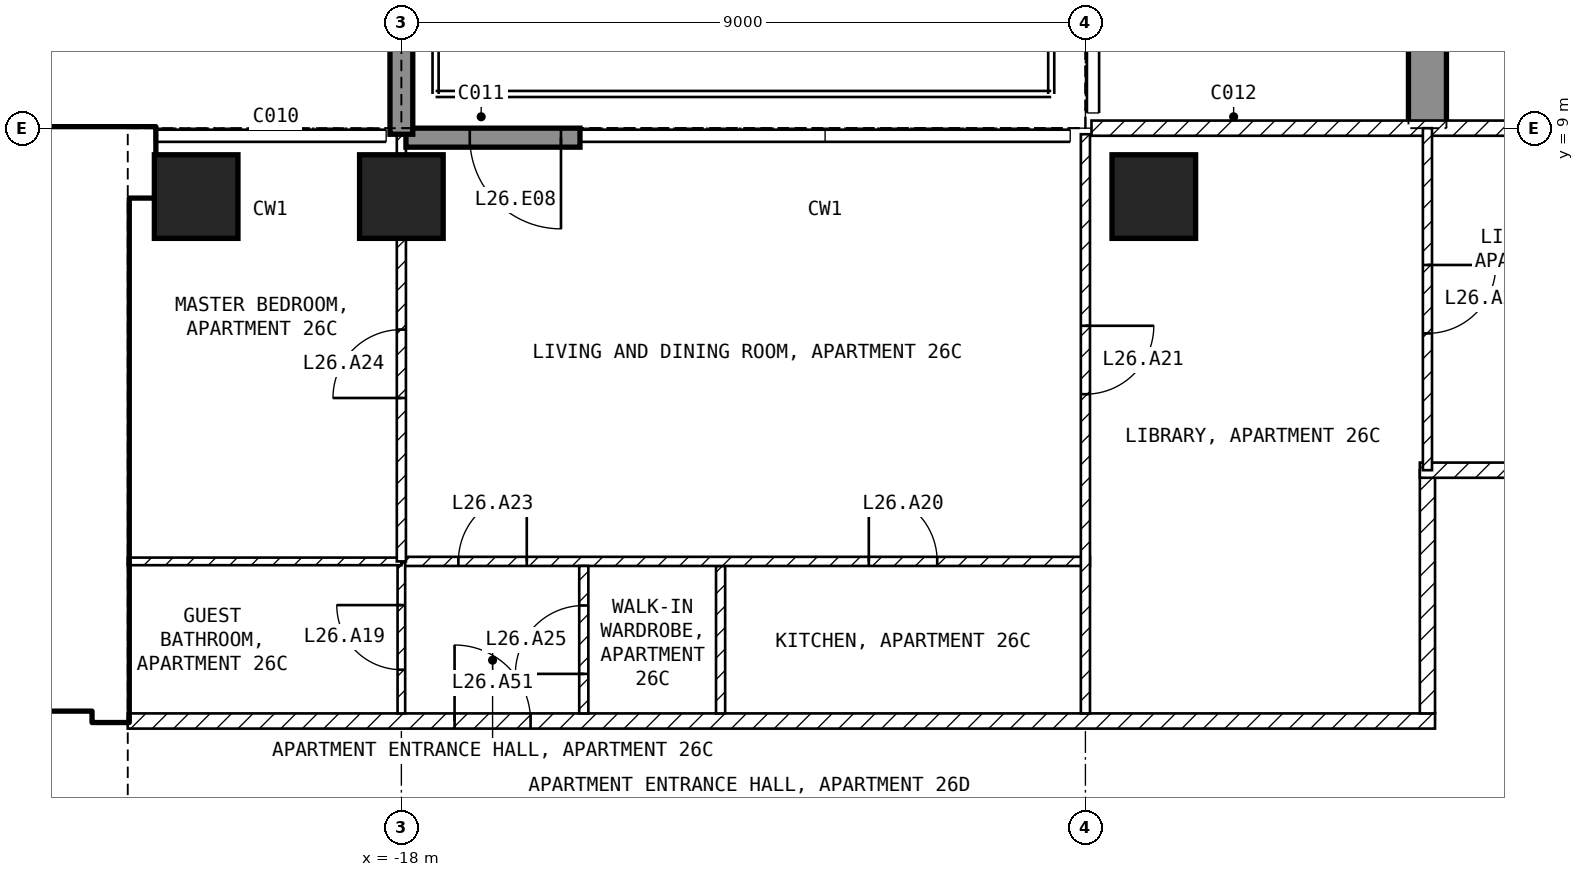
"""IFC4 building model, lengths in metres.
Left out: names, types, materials, properties, quantities, classifications, styles, units other than length and angle.
Written with IfcOpenShell. Run it as: python <this file> out.ifc"""

import sys

from ifc_helpers import new_model, si_unit, direction, frame, frame_2d, origin, origin_2d, place, context, subcontext, project, spatial, polyline, rectangle, outline, extrude, element, fill, save


model = new_model("IFC4")
c1 = context("Model", 3, precision=1e-05, world=origin(), true_north=direction((0.0, 1.0)))
c2 = subcontext(c1, "Body", "Model", "MODEL_VIEW")
j1 = project(units=[si_unit("LENGTHUNIT", "METRE"), si_unit("PLANEANGLEUNIT", "RADIAN")], contexts=[c1])
p1 = place(None, origin())
s1 = spatial("IfcSite", under=j1, at=p1, CompositionType="ELEMENT")
p2 = place(p1, origin())
s2 = spatial("IfcBuilding", under=s1, at=p2, CompositionType="ELEMENT")
p3 = place(p2, frame((0.0, 0.0, 112.9)))
s3 = spatial("IfcBuildingStorey", under=s2, at=p3, CompositionType="ELEMENT", Elevation=112.9)
for number, where, z_axis, x_axis in (
    (1, (-20.7, 8.1, -0.25), (0.0, 0.0, 1.0), (1.0, 0.0, 0.0)),
    (2, (-18.0, 8.1, -0.25), (0.0, 0.0, 1.0), (1.0, 0.0, 0.0)),
    (3, (-8.1, 8.1, -0.25), (0.0, 0.0, 1.0), (1.0, 0.0, 0.0)),
):
    element("IfcColumn", number, at=place(p3, frame(where, z_axis=z_axis, x_axis=x_axis)), inside=s3, PredefinedType="COLUMN", context=c2, shape_type="SweptSolid", body=[
        extrude(rectangle(XDim=1.1, YDim=1.1, at=origin_2d()), origin(), (0.0, 0.0, 1.0), 3.5),
    ])
p4 = place(p3, frame((-4.75, 9.0, -0.25), z_axis=(1.0, 0.0, 0.0), x_axis=(0.0, 1.0, 0.0)))
e4 = element("IfcWall", 4, at=p4, inside=s3, PredefinedType="SHEAR", context=c2, shape_type="SweptSolid", body=[
    extrude(outline(polyline([(0.0, 0.0), (2.1, 0.0), (2.1, 2.65), (4.5, 2.65), (4.5, 0.0), (9.9, 0.0), (9.9, 2.65), (12.3, 2.65), (12.3, 0.0), (16.55, 0.0), (16.55, 3.5), (0.0, 3.5), (0.0, 0.0)])), origin(), (0.0, 0.0, 1.0), 0.5),
])
p5 = place(p3, frame((-15.65, 8.875, 0.0), z_axis=(0.0, 0.0, 1.0), x_axis=(-1.0, 0.0, 0.0)))
e5 = element("IfcWall", 5, at=p5, inside=s3, PredefinedType="SOLIDWALL", context=c2, shape_type="SweptSolid", body=[
    extrude(rectangle(XDim=2.29, YDim=0.25, at=frame_2d((1.145, 0.0))), origin(), (0.0, 0.0, 1.0), 3.25),
])
p6 = place(p5, frame((0.25, 0.0, 0.0)))
e6 = element("IfcOpeningElement", 6, at=p6, cuts=e5, PredefinedType="OPENING", context=c2, shape_type="SweptSolid", body=[
    extrude(rectangle(XDim=1.2, YDim=2.4, at=frame_2d((0.6, 1.2))), frame((0.0, 0.135, 0.0), z_axis=(0.0, -1.0, 0.0), x_axis=(1.0, 0.0, 0.0)), (0.0, 0.0, 1.0), 0.27),
])
p7 = place(p3, frame((-18.0, 8.92, 0.0), z_axis=(0.0, 0.0, 1.0), x_axis=(0.0, 1.0, 0.0)))
e7 = element("IfcWall", 7, at=p7, inside=s3, PredefinedType="SOLIDWALL", context=c2, shape_type="SweptSolid", body=[
    extrude(rectangle(XDim=2.82, YDim=0.3, at=frame_2d((1.41, 0.0))), origin(), (0.0, 0.0, 1.0), 3.25),
])
p8 = place(p3, frame((-29.45, 8.55, 0.0), z_axis=(0.0, 0.0, 1.0), x_axis=(1.0, 0.0, 0.0)))
e8 = element("IfcWall", 8, at=p8, inside=s3, PredefinedType="SHEAR", context=c2, shape_type="SweptSolid", body=[
    extrude(rectangle(XDim=8.2, YDim=0.9, at=frame_2d((4.1, 0.0))), origin(), (0.0, 0.0, 1.0), 3.25),
])
p9 = place(p3, frame((-21.825, 1.2, 0.0), z_axis=(0.0, 0.0, 1.0), x_axis=(0.0, 1.0, 0.0)))
e9 = element("IfcWall", 9, at=p9, inside=s3, PredefinedType="SHEAR", context=c2, shape_type="SweptSolid", body=[
    extrude(rectangle(XDim=6.9, YDim=0.45, at=frame_2d((3.45, 0.0))), origin(), (0.0, 0.0, 1.0), 3.25),
])
p10 = place(p3, frame((-33.05, 1.45, 0.0), z_axis=(0.0, 0.0, 1.0), x_axis=(1.0, 0.0, 0.0)))
e10 = element("IfcWall", 10, at=p10, inside=s3, PredefinedType="SOLIDWALL", context=c2, shape_type="SweptSolid", body=[
    extrude(rectangle(XDim=11.0, YDim=0.2, at=frame_2d((5.5, 0.0))), origin(), (0.0, 0.0, 1.0), 3.25),
])
p11 = place(p10, frame((9.25, 0.0, 0.0)))
e11 = element("IfcOpeningElement", 11, at=p11, cuts=e10, PredefinedType="OPENING", context=c2, shape_type="SweptSolid", body=[
    extrude(rectangle(XDim=1.0, YDim=2.1, at=frame_2d((0.5, 1.05))), frame((0.0, 0.11, 0.0), z_axis=(0.0, -1.0, 0.0), x_axis=(1.0, 0.0, 0.0)), (0.0, 0.0, 1.0), 0.22),
])
p12 = place(p10, frame((6.75, 0.0, 0.0)))
e12 = element("IfcOpeningElement", 12, at=p12, cuts=e10, PredefinedType="OPENING", context=c2, shape_type="SweptSolid", body=[
    extrude(rectangle(XDim=1.0, YDim=2.1, at=frame_2d((0.5, 1.05))), frame((0.0, 0.11, 0.0), z_axis=(0.0, -1.0, 0.0), x_axis=(1.0, 0.0, 0.0)), (0.0, 0.0, 1.0), 0.22),
])
p13 = place(p10, frame((1.025, 0.0, 0.0)))
e13 = element("IfcOpeningElement", 13, at=p13, cuts=e10, PredefinedType="OPENING", context=c2, shape_type="SweptSolid", body=[
    extrude(rectangle(XDim=0.9, YDim=2.1, at=frame_2d((0.45, 1.05))), frame((0.0, 0.11, 0.0), z_axis=(0.0, -1.0, 0.0), x_axis=(1.0, 0.0, 0.0)), (0.0, 0.0, 1.0), 0.22),
])
p14 = place(p3, frame((-28.35, 5.15, 0.0), z_axis=(0.0, 0.0, 1.0), x_axis=(1.0, 0.0, 0.0)))
e14 = element("IfcWall", 14, at=p14, inside=s3, PredefinedType="SOLIDWALL", context=c2, shape_type="SweptSolid", body=[
    extrude(rectangle(XDim=6.3, YDim=0.2, at=frame_2d((3.15, 0.0))), origin(), (0.0, 0.0, 1.0), 3.25),
])
p15 = place(p14, frame((5.1, 0.0, 0.0)))
e15 = element("IfcOpeningElement", 15, at=p15, cuts=e14, PredefinedType="OPENING", context=c2, shape_type="SweptSolid", body=[
    extrude(rectangle(XDim=1.0, YDim=2.1, at=frame_2d((0.5, 1.05))), frame((0.0, 0.11, 0.0), z_axis=(0.0, -1.0, 0.0), x_axis=(1.0, 0.0, 0.0)), (0.0, 0.0, 1.0), 0.22),
])
p16 = place(p3, frame((-21.6, 1.2, 0.0), z_axis=(0.0, 0.0, 1.0), x_axis=(1.0, 0.0, 0.0)))
e16 = element("IfcWall", 16, at=p16, inside=s3, PredefinedType="PARTITIONING", context=c2, shape_type="SweptSolid", body=[
    extrude(rectangle(XDim=17.2, YDim=0.2, at=frame_2d((8.6, 0.0))), origin(), (0.0, 0.0, 1.0), 3.25),
])
p17 = place(p16, frame((4.3, 0.0, 0.0)))
e17 = element("IfcOpeningElement", 17, at=p17, cuts=e16, PredefinedType="OPENING", context=c2, shape_type="SweptSolid", body=[
    extrude(rectangle(XDim=1.0, YDim=2.1, at=frame_2d((0.5, 1.05))), frame((0.0, 0.11, 0.0), z_axis=(0.0, -1.0, 0.0), x_axis=(1.0, 0.0, 0.0)), (0.0, 0.0, 1.0), 0.22),
])
p18 = place(p3, frame((-4.5, 1.3, 0.0), z_axis=(0.0, 0.0, 1.0), x_axis=(0.0, 1.0, 0.0)))
e18 = element("IfcWall", 18, at=p18, inside=s3, PredefinedType="PARTITIONING", context=c2, shape_type="SweptSolid", body=[
    extrude(rectangle(XDim=3.2, YDim=0.2, at=frame_2d((1.6, 0.0))), origin(), (0.0, 0.0, 1.0), 3.25),
])
p19 = place(p3, frame((-4.6, 4.5, 0.0), z_axis=(0.0, 0.0, 1.0), x_axis=(1.0, 0.0, 0.0)))
e19 = element("IfcWall", 19, at=p19, inside=s3, PredefinedType="PARTITIONING", context=c2, shape_type="SweptSolid", body=[
    extrude(rectangle(XDim=3.5, YDim=0.2, at=frame_2d((1.75, 0.0))), origin(), (0.0, 0.0, 1.0), 3.25),
])
p20 = place(p3, frame((-8.92, 9.0, 0.0), z_axis=(0.0, 0.0, 1.0), x_axis=(1.0, 0.0, 0.0)))
e20 = element("IfcWall", 20, at=p20, inside=s3, PredefinedType="PARTITIONING", context=c2, shape_type="SweptSolid", body=[
    extrude(rectangle(XDim=17.84, YDim=0.2, at=frame_2d((8.92, 0.0))), origin(), (0.0, 0.0, 1.0), 3.25),
])
p21 = place(p20, frame((8.42, 0.0, 0.0)))
e21 = element("IfcOpeningElement", 21, at=p21, cuts=e20, PredefinedType="OPENING", context=c2, shape_type="SweptSolid", body=[
    extrude(rectangle(XDim=1.0, YDim=2.1, at=frame_2d((0.5, 1.05))), frame((0.0, 0.11, 0.0), z_axis=(0.0, -1.0, 0.0), x_axis=(1.0, 0.0, 0.0)), (0.0, 0.0, 1.0), 0.22),
])
p22 = place(p3, frame((-13.8, 1.3, 0.0), z_axis=(0.0, 0.0, 1.0), x_axis=(0.0, 1.0, 0.0)))
e22 = element("IfcWall", 22, at=p22, inside=s3, PredefinedType="PARTITIONING", context=c2, shape_type="SweptSolid", body=[
    extrude(rectangle(XDim=1.94, YDim=0.12, at=frame_2d((0.97, 0.0))), origin(), (0.0, 0.0, 1.0), 3.25),
])
p23 = place(p3, frame((-18.0, 3.3, 0.0), z_axis=(0.0, 0.0, 1.0), x_axis=(1.0, 0.0, 0.0)))
e23 = element("IfcWall", 23, at=p23, inside=s3, PredefinedType="PARTITIONING", context=c2, shape_type="SweptSolid", body=[
    extrude(rectangle(XDim=9.06, YDim=0.12, at=frame_2d((4.53, 0.0))), origin(), (0.0, 0.0, 1.0), 3.25),
])
p24 = place(p23, frame((6.15, 0.0, 0.0)))
e24 = element("IfcOpeningElement", 24, at=p24, cuts=e23, PredefinedType="OPENING", context=c2, shape_type="SweptSolid", body=[
    extrude(rectangle(XDim=0.9, YDim=2.1, at=frame_2d((0.45, 1.05))), frame((0.0, 0.07, 0.0), z_axis=(0.0, -1.0, 0.0), x_axis=(1.0, 0.0, 0.0)), (0.0, 0.0, 1.0), 0.14),
])
p25 = place(p23, frame((0.75, 0.0, 0.0)))
e25 = element("IfcOpeningElement", 25, at=p25, cuts=e23, PredefinedType="OPENING", context=c2, shape_type="SweptSolid", body=[
    extrude(rectangle(XDim=0.9, YDim=2.1, at=frame_2d((0.45, 1.05))), frame((0.0, 0.07, 0.0), z_axis=(0.0, -1.0, 0.0), x_axis=(1.0, 0.0, 0.0)), (0.0, 0.0, 1.0), 0.14),
])
p26 = place(p3, frame((-9.0, 8.92, 0.0), z_axis=(0.0, 0.0, 1.0), x_axis=(0.0, -1.0, 0.0)))
e26 = element("IfcWall", 26, at=p26, inside=s3, PredefinedType="PARTITIONING", context=c2, shape_type="SweptSolid", body=[
    extrude(rectangle(XDim=7.62, YDim=0.12, at=frame_2d((3.81, 0.0))), origin(), (0.0, 0.0, 1.0), 3.25),
])
p27 = place(p26, frame((2.52, 0.0, 0.0)))
e27 = element("IfcOpeningElement", 27, at=p27, cuts=e26, PredefinedType="OPENING", context=c2, shape_type="SweptSolid", body=[
    extrude(rectangle(XDim=0.9, YDim=2.1, at=frame_2d((0.45, 1.05))), frame((0.0, 0.07, 0.0), z_axis=(0.0, -1.0, 0.0), x_axis=(1.0, 0.0, 0.0)), (0.0, 0.0, 1.0), 0.14),
])
p28 = place(p3, frame((-15.6, 1.3, 0.0), z_axis=(0.0, 0.0, 1.0), x_axis=(0.0, 1.0, 0.0)))
e28 = element("IfcWall", 28, at=p28, inside=s3, PredefinedType="PARTITIONING", context=c2, shape_type="SweptSolid", body=[
    extrude(rectangle(XDim=1.94, YDim=0.12, at=frame_2d((0.97, 0.0))), origin(), (0.0, 0.0, 1.0), 3.25),
])
p29 = place(p28, frame((0.52, 0.0, 0.0)))
e29 = element("IfcOpeningElement", 29, at=p29, cuts=e28, PredefinedType="OPENING", context=c2, shape_type="SweptSolid", body=[
    extrude(rectangle(XDim=0.9, YDim=2.1, at=frame_2d((0.45, 1.05))), frame((0.0, 0.07, 0.0), z_axis=(0.0, -1.0, 0.0), x_axis=(1.0, 0.0, 0.0)), (0.0, 0.0, 1.0), 0.14),
])
p30 = place(p3, frame((-18.0, 1.3, 0.0), z_axis=(0.0, 0.0, 1.0), x_axis=(0.0, 1.0, 0.0)))
e30 = element("IfcWall", 30, at=p30, inside=s3, PredefinedType="PARTITIONING", context=c2, shape_type="SweptSolid", body=[
    extrude(rectangle(XDim=2.0, YDim=0.1, at=frame_2d((1.0, 0.0))), origin(), (0.0, 0.0, 1.0), 2.414),
])
p31 = place(p30, frame((0.575, 0.0, 0.0)))
e31 = element("IfcOpeningElement", 31, at=p31, cuts=e30, PredefinedType="OPENING", context=c2, shape_type="SweptSolid", body=[
    extrude(rectangle(XDim=0.85, YDim=2.1, at=frame_2d((0.425, 1.05))), frame((0.0, 0.06, 0.0), z_axis=(0.0, -1.0, 0.0), x_axis=(1.0, 0.0, 0.0)), (0.0, 0.0, 1.0), 0.12),
])
p32 = place(p3, frame((-21.6, 3.3, 0.0), z_axis=(0.0, 0.0, 1.0), x_axis=(1.0, 0.0, 0.0)))
e32 = element("IfcWall", 32, at=p32, inside=s3, PredefinedType="PARTITIONING", context=c2, shape_type="SweptSolid", body=[
    extrude(rectangle(XDim=3.6, YDim=0.1, at=frame_2d((1.8, 0.0))), origin(), (0.0, 0.0, 1.0), 3.25),
])
p33 = place(p3, frame((-18.0, 3.3, 0.0), z_axis=(0.0, 0.0, 1.0), x_axis=(0.0, 1.0, 0.0)))
e33 = element("IfcWall", 33, at=p33, inside=s3, PredefinedType="PARTITIONING", context=c2, shape_type="SweptSolid", body=[
    extrude(rectangle(XDim=5.62, YDim=0.12, at=frame_2d((2.81, 0.0))), origin(), (0.0, 0.0, 1.0), 2.414),
])
p34 = place(p33, frame((2.15, 0.0, 0.0)))
e34 = element("IfcOpeningElement", 34, at=p34, cuts=e33, PredefinedType="OPENING", context=c2, shape_type="SweptSolid", body=[
    extrude(rectangle(XDim=0.9, YDim=2.1, at=frame_2d((0.45, 1.05))), frame((0.0, 0.07, 0.0), z_axis=(0.0, -1.0, 0.0), x_axis=(1.0, 0.0, 0.0)), (0.0, 0.0, 1.0), 0.14),
])
p35 = place(p3, frame((-4.5, 9.0, 0.0), z_axis=(0.0, 0.0, 1.0), x_axis=(0.0, -1.0, 0.0)))
e35 = element("IfcWall", 35, at=p35, inside=s3, PredefinedType="PARTITIONING", context=c2, shape_type="SweptSolid", body=[
    extrude(rectangle(XDim=4.5, YDim=0.12, at=frame_2d((2.25, 0.0))), origin(), (0.0, 0.0, 1.0), 3.25),
])
p36 = place(p35, frame((1.8, 0.0, 0.0)))
e36 = element("IfcOpeningElement", 36, at=p36, cuts=e35, PredefinedType="OPENING", context=c2, shape_type="SweptSolid", body=[
    extrude(rectangle(XDim=0.9, YDim=2.1, at=frame_2d((0.45, 1.05))), frame((0.0, 0.07, 0.0), z_axis=(0.0, -1.0, 0.0), x_axis=(1.0, 0.0, 0.0)), (0.0, 0.0, 1.0), 0.14),
])
p37 = place(p6, origin())
e37 = element("IfcDoor", 37, at=p37, inside=s3, OperationType="SINGLE_SWING_LEFT", PredefinedType="DOOR", context=c2, shape_type="SweptSolid", body=[
    extrude(rectangle(XDim=1.2, YDim=2.4, at=frame_2d((0.6, 1.2))), frame((0.0, 0.025, 0.0), z_axis=(0.0, -1.0, 0.0), x_axis=(1.0, 0.0, 0.0)), (0.0, 0.0, 1.0), 0.05),
])
fill(e6, e37)
p38 = place(p15, origin())
e38 = element("IfcDoor", 38, at=p38, inside=s3, OperationType="SINGLE_SWING_LEFT", PredefinedType="DOOR", context=c2, shape_type="SweptSolid", body=[
    extrude(rectangle(XDim=1.0, YDim=2.1, at=frame_2d((0.5, 1.05))), frame((0.0, 0.025, 0.0), z_axis=(0.0, -1.0, 0.0), x_axis=(1.0, 0.0, 0.0)), (0.0, 0.0, 1.0), 0.05),
])
fill(e15, e38)
p39 = place(p31, origin())
e39 = element("IfcDoor", 39, at=p39, inside=s3, OperationType="SINGLE_SWING_RIGHT", PredefinedType="DOOR", context=c2, shape_type="SweptSolid", body=[
    extrude(rectangle(XDim=0.85, YDim=2.1, at=frame_2d((0.425, 1.05))), frame((0.0, 0.025, 0.0), z_axis=(0.0, -1.0, 0.0), x_axis=(1.0, 0.0, 0.0)), (0.0, 0.0, 1.0), 0.05),
])
fill(e31, e39)
p40 = place(p24, origin())
e40 = element("IfcDoor", 40, at=p40, inside=s3, OperationType="SINGLE_SWING_LEFT", PredefinedType="DOOR", context=c2, shape_type="SweptSolid", body=[
    extrude(rectangle(XDim=0.9, YDim=2.1, at=frame_2d((0.45, 1.05))), frame((0.0, 0.025, 0.0), z_axis=(0.0, -1.0, 0.0), x_axis=(1.0, 0.0, 0.0)), (0.0, 0.0, 1.0), 0.05),
])
fill(e24, e40)
p41 = place(p27, origin())
e41 = element("IfcDoor", 41, at=p41, inside=s3, OperationType="SINGLE_SWING_LEFT", PredefinedType="DOOR", context=c2, shape_type="SweptSolid", body=[
    extrude(rectangle(XDim=0.9, YDim=2.1, at=frame_2d((0.45, 1.05))), frame((0.0, 0.025, 0.0), z_axis=(0.0, -1.0, 0.0), x_axis=(1.0, 0.0, 0.0)), (0.0, 0.0, 1.0), 0.05),
])
fill(e27, e41)
p42 = place(p36, origin())
e42 = element("IfcDoor", 42, at=p42, inside=s3, OperationType="SINGLE_SWING_LEFT", PredefinedType="DOOR", context=c2, shape_type="SweptSolid", body=[
    extrude(rectangle(XDim=0.9, YDim=2.1, at=frame_2d((0.45, 1.05))), frame((0.0, 0.025, 0.0), z_axis=(0.0, -1.0, 0.0), x_axis=(1.0, 0.0, 0.0)), (0.0, 0.0, 1.0), 0.05),
])
fill(e36, e42)
p43 = place(p25, origin())
e43 = element("IfcDoor", 43, at=p43, inside=s3, OperationType="SINGLE_SWING_RIGHT", PredefinedType="DOOR", context=c2, shape_type="SweptSolid", body=[
    extrude(rectangle(XDim=0.9, YDim=2.1, at=frame_2d((0.45, 1.05))), frame((0.0, 0.025, 0.0), z_axis=(0.0, -1.0, 0.0), x_axis=(1.0, 0.0, 0.0)), (0.0, 0.0, 1.0), 0.05),
])
fill(e25, e43)
p44 = place(p34, origin())
e44 = element("IfcDoor", 44, at=p44, inside=s3, OperationType="SINGLE_SWING_LEFT", PredefinedType="DOOR", context=c2, shape_type="SweptSolid", body=[
    extrude(rectangle(XDim=0.9, YDim=2.1, at=frame_2d((0.45, 1.05))), frame((0.0, 0.025, 0.0), z_axis=(0.0, -1.0, 0.0), x_axis=(1.0, 0.0, 0.0)), (0.0, 0.0, 1.0), 0.05),
])
fill(e34, e44)
p45 = place(p29, origin())
e45 = element("IfcDoor", 45, at=p45, inside=s3, OperationType="SINGLE_SWING_LEFT", PredefinedType="DOOR", context=c2, shape_type="SweptSolid", body=[
    extrude(rectangle(XDim=0.9, YDim=2.1, at=frame_2d((0.45, 1.05))), frame((0.0, 0.025, 0.0), z_axis=(0.0, -1.0, 0.0), x_axis=(1.0, 0.0, 0.0)), (0.0, 0.0, 1.0), 0.05),
])
fill(e29, e45)
p46 = place(p17, origin())
e46 = element("IfcDoor", 46, at=p46, inside=s3, OperationType="SINGLE_SWING_LEFT", PredefinedType="DOOR", context=c2, shape_type="SweptSolid", body=[
    extrude(rectangle(XDim=1.0, YDim=2.1, at=frame_2d((0.5, 1.05))), frame((0.0, 0.025, 0.0), z_axis=(0.0, -1.0, 0.0), x_axis=(1.0, 0.0, 0.0)), (0.0, 0.0, 1.0), 0.05),
])
fill(e17, e46)
save(model, sys.argv[1])
